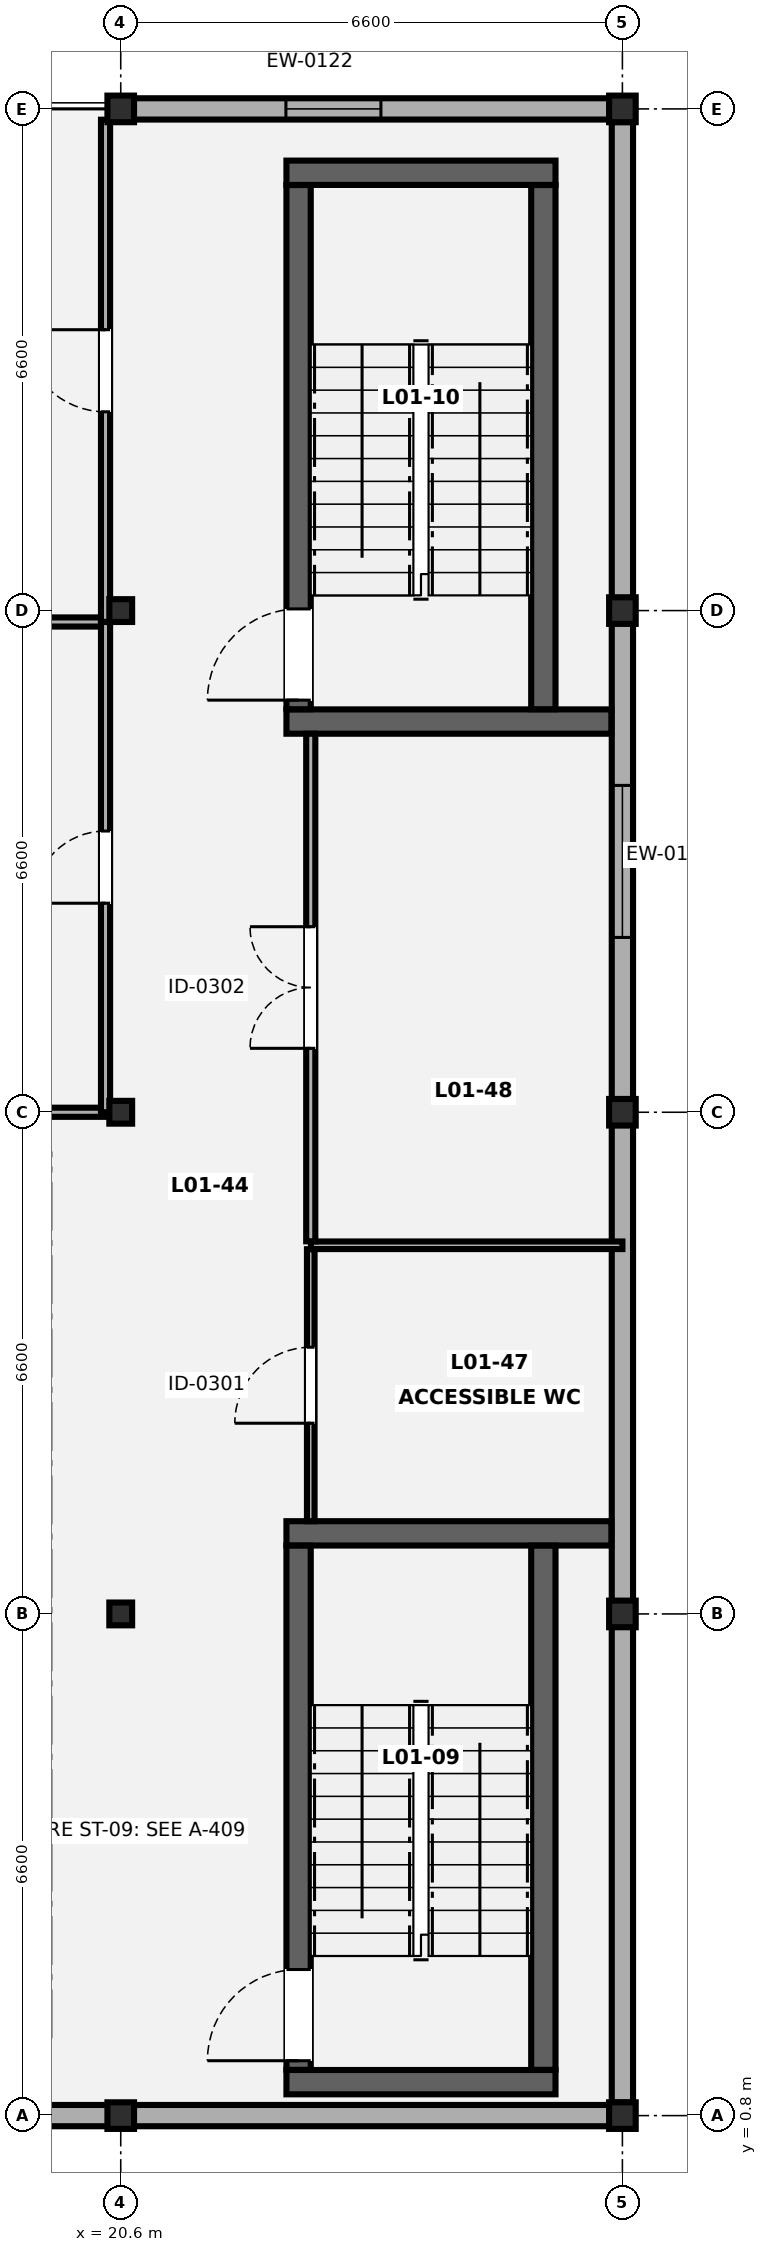
"""IFC4 building model, lengths in metres.
Left out: names, types, materials, properties, quantities, classifications, styles, units other than length and angle.
Written with IfcOpenShell. Run it as: python <this file> out.ifc"""

import sys

from ifc_helpers import new_model, si_unit, direction, frame, frame_2d, origin, origin_2d, place, context, subcontext, project, spatial, rectangle, hollow_rectangle, i_section, extrude, element, fill, save


model = new_model("IFC4")
c1 = context("Model", 3, precision=1e-05, world=origin(), true_north=direction((0.0, 1.0)))
c2 = subcontext(c1, "Body", "Model", "MODEL_VIEW")
j1 = project(units=[si_unit("LENGTHUNIT", "METRE"), si_unit("PLANEANGLEUNIT", "RADIAN")], contexts=[c1])
p1 = place(None, origin())
s1 = spatial("IfcSite", under=j1, at=p1, CompositionType="ELEMENT")
p2 = place(p1, origin())
s2 = spatial("IfcBuilding", under=s1, at=p2, CompositionType="ELEMENT")
p3 = place(p2, frame((0.0, 0.0, 4.9)))
s3 = spatial("IfcBuildingStorey", under=s2, at=p3, CompositionType="ELEMENT", Elevation=4.9)
p4 = place(p3, frame((20.6, 0.8, 0.0), z_axis=(0.0, 0.0, 1.0), x_axis=(1.0, 0.0, 0.0)))
e1 = element("IfcColumn", 1, at=p4, inside=s3, PredefinedType="COLUMN", context=c2, shape_type="SweptSolid", body=[
    extrude(i_section(OverallWidth=0.35, OverallDepth=0.35, WebThickness=0.02, FlangeThickness=0.032, FilletRadius=0.016, at=origin_2d()), origin(), (0.0, 0.0, 1.0), 4.2),
])
for number, where, z_axis, x_axis in (
    (2, (20.6, 7.4, 0.0), (0.0, 0.0, 1.0), (1.0, 0.0, 0.0)),
    (3, (20.6, 14.0, 0.0), (0.0, 0.0, 1.0), (1.0, 0.0, 0.0)),
    (4, (20.6, 20.6, 0.0), (0.0, 0.0, 1.0), (1.0, 0.0, 0.0)),
):
    element("IfcColumn", number, at=place(p3, frame(where, z_axis=z_axis, x_axis=x_axis)), inside=s3, PredefinedType="COLUMN", context=c2, shape_type="SweptSolid", body=[
        extrude(hollow_rectangle(XDim=0.3, YDim=0.3, WallThickness=0.012, at=origin_2d()), origin(), (0.0, 0.0, 1.0), 4.2),
    ])
for number, where, z_axis, x_axis in (
    (5, (20.6, 27.2, 0.0), (0.0, 0.0, 1.0), (1.0, 0.0, 0.0)),
    (6, (27.2, 0.8, 0.0), (0.0, 0.0, 1.0), (1.0, 0.0, 0.0)),
    (7, (27.2, 7.4, 0.0), (0.0, 0.0, 1.0), (1.0, 0.0, 0.0)),
    (8, (27.2, 14.0, 0.0), (0.0, 0.0, 1.0), (1.0, 0.0, 0.0)),
    (9, (27.2, 20.6, 0.0), (0.0, 0.0, 1.0), (1.0, 0.0, 0.0)),
    (10, (27.2, 27.2, 0.0), (0.0, 0.0, 1.0), (1.0, 0.0, 0.0)),
):
    element("IfcColumn", number, at=place(p3, frame(where, z_axis=z_axis, x_axis=x_axis)), inside=s3, PredefinedType="COLUMN", context=c2, shape_type="SweptSolid", body=[
        extrude(i_section(OverallWidth=0.35, OverallDepth=0.35, WebThickness=0.02, FlangeThickness=0.032, FilletRadius=0.016, at=origin_2d()), origin(), (0.0, 0.0, 1.0), 4.2),
    ])
p5 = place(p3, frame((20.773, 27.2, 0.0), z_axis=(0.0, 0.0, 1.0), x_axis=(1.0, 0.0, 0.0)))
e11 = element("IfcWall", 11, at=p5, inside=s3, PredefinedType="SOLIDWALL", context=c2, shape_type="SweptSolid", body=[
    extrude(rectangle(XDim=6.254, YDim=0.28, at=frame_2d((3.127, 0.0))), origin(), (0.0, 0.0, 1.0), 3.505),
])
p6 = place(p5, frame((2.0, 0.0, 0.85)))
e12 = element("IfcOpeningElement", 12, at=p6, cuts=e11, PredefinedType="OPENING", context=c2, shape_type="SweptSolid", body=[
    extrude(rectangle(XDim=1.25, YDim=1.4, at=frame_2d((0.625, 0.7))), frame((0.0, 0.15, 0.0), z_axis=(0.0, -1.0, 0.0), x_axis=(1.0, 0.0, 0.0)), (0.0, 0.0, 1.0), 0.3),
])
p7 = place(p3, frame((27.2, 27.027, 0.0), z_axis=(0.0, 0.0, 1.0), x_axis=(0.0, -1.0, 0.0)))
e13 = element("IfcWall", 13, at=p7, inside=s3, PredefinedType="SOLIDWALL", context=c2, shape_type="SweptSolid", body=[
    extrude(rectangle(XDim=26.054, YDim=0.28, at=frame_2d((13.027, 0.0))), origin(), (0.0, 0.0, 1.0), 3.445),
])
p8 = place(p7, frame((8.727, 0.0, 0.85)))
e14 = element("IfcOpeningElement", 14, at=p8, cuts=e13, PredefinedType="OPENING", context=c2, shape_type="SweptSolid", body=[
    extrude(rectangle(XDim=2.0, YDim=1.4, at=frame_2d((1.0, 0.7))), frame((0.0, 0.15, 0.0), z_axis=(0.0, -1.0, 0.0), x_axis=(1.0, 0.0, 0.0)), (0.0, 0.0, 1.0), 0.3),
])
p9 = place(p3, frame((27.027, 0.8, 0.0), z_axis=(0.0, 0.0, 1.0), x_axis=(-1.0, 0.0, 0.0)))
e15 = element("IfcWall", 15, at=p9, inside=s3, PredefinedType="SOLIDWALL", context=c2, shape_type="SweptSolid", body=[
    extrude(rectangle(XDim=26.054, YDim=0.28, at=frame_2d((13.027, 0.0))), origin(), (0.0, 0.0, 1.0), 3.505),
])
p10 = place(p9, frame((8.0, 0.0, 0.85)))
e16 = element("IfcOpeningElement", 16, at=p10, cuts=e15, PredefinedType="OPENING", context=c2, shape_type="SweptSolid", body=[
    extrude(rectangle(XDim=2.3, YDim=1.4, at=frame_2d((1.15, 0.7))), frame((0.0, 0.15, 0.0), z_axis=(0.0, -1.0, 0.0), x_axis=(1.0, 0.0, 0.0)), (0.0, 0.0, 1.0), 0.3),
])
p11 = place(p9, frame((16.0, 0.0, 0.85)))
e17 = element("IfcOpeningElement", 17, at=p11, cuts=e15, PredefinedType="OPENING", context=c2, shape_type="SweptSolid", body=[
    extrude(rectangle(XDim=2.45, YDim=1.4, at=frame_2d((1.225, 0.7))), frame((0.0, 0.15, 0.0), z_axis=(0.0, -1.0, 0.0), x_axis=(1.0, 0.0, 0.0)), (0.0, 0.0, 1.0), 0.3),
])
p12 = place(p3, frame((22.78, 1.24, 0.0), z_axis=(0.0, 0.0, 1.0), x_axis=(1.0, 0.0, 0.0)))
e18 = element("IfcWall", 18, at=p12, inside=s3, PredefinedType="SHEAR", context=c2, shape_type="SweptSolid", body=[
    extrude(rectangle(XDim=3.54, YDim=0.32, at=frame_2d((1.77, 0.0))), origin(), (0.0, 0.0, 1.0), 3.96),
])
p13 = place(p3, frame((22.78, 8.46, 0.0), z_axis=(0.0, 0.0, 1.0), x_axis=(1.0, 0.0, 0.0)))
e19 = element("IfcWall", 19, at=p13, inside=s3, PredefinedType="SHEAR", context=c2, shape_type="SweptSolid", body=[
    extrude(rectangle(XDim=4.275, YDim=0.32, at=frame_2d((2.137, 0.0))), origin(), (0.0, 0.0, 1.0), 3.96),
])
p14 = place(p3, frame((22.94, 1.402, 0.0), z_axis=(0.0, 0.0, 1.0), x_axis=(0.0, 1.0, 0.0)))
e20 = element("IfcWall", 20, at=p14, inside=s3, PredefinedType="SHEAR", context=c2, shape_type="SweptSolid", body=[
    extrude(rectangle(XDim=6.896, YDim=0.32, at=frame_2d((3.448, 0.0))), origin(), (0.0, 0.0, 1.0), 3.96),
])
p15 = place(p14, frame((0.12, 0.0, 0.0)))
e21 = element("IfcOpeningElement", 21, at=p15, cuts=e20, PredefinedType="OPENING", context=c2, shape_type="SweptSolid", body=[
    extrude(rectangle(XDim=1.2, YDim=2.15, at=frame_2d((0.6, 1.075))), frame((0.0, 0.17, 0.0), z_axis=(0.0, -1.0, 0.0), x_axis=(1.0, 0.0, 0.0)), (0.0, 0.0, 1.0), 0.34),
])
p16 = place(p3, frame((26.16, 1.402, 0.0), z_axis=(0.0, 0.0, 1.0), x_axis=(0.0, 1.0, 0.0)))
e22 = element("IfcWall", 22, at=p16, inside=s3, PredefinedType="SHEAR", context=c2, shape_type="SweptSolid", body=[
    extrude(rectangle(XDim=6.896, YDim=0.32, at=frame_2d((3.448, 0.0))), origin(), (0.0, 0.0, 1.0), 3.96),
])
p17 = place(p3, frame((22.78, 19.14, 0.0), z_axis=(0.0, 0.0, 1.0), x_axis=(1.0, 0.0, 0.0)))
e23 = element("IfcWall", 23, at=p17, inside=s3, PredefinedType="SHEAR", context=c2, shape_type="SweptSolid", body=[
    extrude(rectangle(XDim=4.275, YDim=0.32, at=frame_2d((2.137, 0.0))), origin(), (0.0, 0.0, 1.0), 3.96),
])
p18 = place(p3, frame((22.78, 26.36, 0.0), z_axis=(0.0, 0.0, 1.0), x_axis=(1.0, 0.0, 0.0)))
e24 = element("IfcWall", 24, at=p18, inside=s3, PredefinedType="SHEAR", context=c2, shape_type="SweptSolid", body=[
    extrude(rectangle(XDim=3.54, YDim=0.32, at=frame_2d((1.77, 0.0))), origin(), (0.0, 0.0, 1.0), 3.96),
])
p19 = place(p3, frame((22.94, 19.302, 0.0), z_axis=(0.0, 0.0, 1.0), x_axis=(0.0, 1.0, 0.0)))
e25 = element("IfcWall", 25, at=p19, inside=s3, PredefinedType="SHEAR", context=c2, shape_type="SweptSolid", body=[
    extrude(rectangle(XDim=6.896, YDim=0.32, at=frame_2d((3.448, 0.0))), origin(), (0.0, 0.0, 1.0), 3.96),
])
p20 = place(p19, frame((0.12, 0.0, 0.0)))
e26 = element("IfcOpeningElement", 26, at=p20, cuts=e25, PredefinedType="OPENING", context=c2, shape_type="SweptSolid", body=[
    extrude(rectangle(XDim=1.2, YDim=2.15, at=frame_2d((0.6, 1.075))), frame((0.0, 0.17, 0.0), z_axis=(0.0, -1.0, 0.0), x_axis=(1.0, 0.0, 0.0)), (0.0, 0.0, 1.0), 0.34),
])
p21 = place(p3, frame((26.16, 19.302, 0.0), z_axis=(0.0, 0.0, 1.0), x_axis=(0.0, 1.0, 0.0)))
e27 = element("IfcWall", 27, at=p21, inside=s3, PredefinedType="SHEAR", context=c2, shape_type="SweptSolid", body=[
    extrude(rectangle(XDim=6.896, YDim=0.32, at=frame_2d((3.448, 0.0))), origin(), (0.0, 0.0, 1.0), 3.96),
])
for number, where, z_axis, x_axis in (
    (28, (0.8, 14.0, 0.0), (0.0, 0.0, 1.0), (1.0, 0.0, 0.0)),
    (29, (0.8, 20.45, 0.0), (0.0, 0.0, 1.0), (1.0, 0.0, 0.0)),
):
    element("IfcWall", number, at=place(p3, frame(where, z_axis=z_axis, x_axis=x_axis)), inside=s3, PredefinedType="PARTITIONING", context=c2, shape_type="SweptSolid", body=[
        extrude(rectangle(XDim=19.6, YDim=0.12, at=frame_2d((9.8, 0.0))), origin(), (0.0, 0.0, 1.0), 2.997),
    ])
p22 = place(p3, frame((20.4, 14.0, 0.0), z_axis=(0.0, 0.0, 1.0), x_axis=(0.0, 1.0, 0.0)))
e30 = element("IfcWall", 30, at=p22, inside=s3, PredefinedType="PARTITIONING", context=c2, shape_type="SweptSolid", body=[
    extrude(rectangle(XDim=6.45, YDim=0.12, at=frame_2d((3.225, 0.0))), origin(), (0.0, 0.0, 1.0), 3.445),
])
p23 = place(p22, frame((2.75, 0.0, 0.0)))
e31 = element("IfcOpeningElement", 31, at=p23, cuts=e30, PredefinedType="OPENING", context=c2, shape_type="SweptSolid", body=[
    extrude(rectangle(XDim=0.95, YDim=2.1, at=frame_2d((0.475, 1.05))), frame((0.0, 0.07, 0.0), z_axis=(0.0, -1.0, 0.0), x_axis=(1.0, 0.0, 0.0)), (0.0, 0.0, 1.0), 0.14),
])
p24 = place(p3, frame((20.4, 20.452, 0.0), z_axis=(0.0, 0.0, 1.0), x_axis=(0.0, 1.0, 0.0)))
e32 = element("IfcWall", 32, at=p24, inside=s3, PredefinedType="PARTITIONING", context=c2, shape_type="SweptSolid", body=[
    extrude(rectangle(XDim=6.606, YDim=0.12, at=frame_2d((3.303, 0.0))), origin(), (0.0, 0.0, 1.0), 3.445),
])
p25 = place(p24, frame((2.763, 0.0, 0.0)))
e33 = element("IfcOpeningElement", 33, at=p25, cuts=e32, PredefinedType="OPENING", context=c2, shape_type="SweptSolid", body=[
    extrude(rectangle(XDim=1.08, YDim=2.12, at=frame_2d((0.54, 1.06))), frame((0.0, 0.07, 0.0), z_axis=(0.0, -1.0, 0.0), x_axis=(1.0, 0.0, 0.0)), (0.0, 0.0, 1.0), 0.14),
])
p26 = place(p3, frame((23.102, 12.25, 0.0), z_axis=(0.0, 0.0, 1.0), x_axis=(1.0, 0.0, 0.0)))
e34 = element("IfcWall", 34, at=p26, inside=s3, PredefinedType="PARTITIONING", context=c2, shape_type="SweptSolid", body=[
    extrude(rectangle(XDim=4.098, YDim=0.1, at=frame_2d((2.049, 0.0))), origin(), (0.0, 0.0, 1.0), 3.96),
])
p27 = place(p3, frame((23.1, 8.62, 0.0), z_axis=(0.0, 0.0, 1.0), x_axis=(0.0, 1.0, 0.0)))
e35 = element("IfcWall", 35, at=p27, inside=s3, PredefinedType="PARTITIONING", context=c2, shape_type="SweptSolid", body=[
    extrude(rectangle(XDim=3.578, YDim=0.1, at=frame_2d((1.789, 0.0))), origin(), (0.0, 0.0, 1.0), 3.96),
])
p28 = place(p27, frame((1.289, 0.0, 0.0)))
e36 = element("IfcOpeningElement", 36, at=p28, cuts=e35, PredefinedType="OPENING", context=c2, shape_type="SweptSolid", body=[
    extrude(rectangle(XDim=1.0, YDim=2.1, at=frame_2d((0.5, 1.05))), frame((0.0, 0.06, 0.0), z_axis=(0.0, -1.0, 0.0), x_axis=(1.0, 0.0, 0.0)), (0.0, 0.0, 1.0), 0.12),
])
p29 = place(p3, frame((23.1, 12.302, 0.0), z_axis=(0.0, 0.0, 1.0), x_axis=(0.0, 1.0, 0.0)))
e37 = element("IfcWall", 37, at=p29, inside=s3, PredefinedType="PARTITIONING", context=c2, shape_type="SweptSolid", body=[
    extrude(rectangle(XDim=6.678, YDim=0.12, at=frame_2d((3.339, 0.0))), origin(), (0.0, 0.0, 1.0), 3.96),
])
p30 = place(p29, frame((2.539, 0.0, 0.0)))
e38 = element("IfcOpeningElement", 38, at=p30, cuts=e37, PredefinedType="OPENING", context=c2, shape_type="SweptSolid", body=[
    extrude(rectangle(XDim=1.6, YDim=2.18, at=frame_2d((0.8, 1.09))), frame((0.0, 0.07, 0.0), z_axis=(0.0, -1.0, 0.0), x_axis=(1.0, 0.0, 0.0)), (0.0, 0.0, 1.0), 0.14),
])
p31 = place(p6, origin())
e39 = element("IfcWindow", 39, at=p31, inside=s3, PartitioningType="SINGLE_PANEL", PredefinedType="WINDOW", context=c2, shape_type="SweptSolid", body=[
    extrude(rectangle(XDim=1.25, YDim=1.4, at=frame_2d((0.625, 0.7))), frame((0.0, 0.03, 0.0), z_axis=(0.0, -1.0, 0.0), x_axis=(1.0, 0.0, 0.0)), (0.0, 0.0, 1.0), 0.06),
])
fill(e12, e39)
p32 = place(p8, origin())
e40 = element("IfcWindow", 40, at=p32, inside=s3, PartitioningType="SINGLE_PANEL", PredefinedType="WINDOW", context=c2, shape_type="SweptSolid", body=[
    extrude(rectangle(XDim=2.0, YDim=1.4, at=frame_2d((1.0, 0.7))), frame((0.0, 0.03, 0.0), z_axis=(0.0, -1.0, 0.0), x_axis=(1.0, 0.0, 0.0)), (0.0, 0.0, 1.0), 0.06),
])
fill(e14, e40)
p33 = place(p15, origin())
e41 = element("IfcDoor", 41, at=p33, inside=s3, OperationType="SINGLE_SWING_LEFT", PredefinedType="DOOR", context=c2, shape_type="SweptSolid", body=[
    extrude(rectangle(XDim=1.2, YDim=2.15, at=frame_2d((0.6, 1.075))), frame((0.0, 0.025, 0.0), z_axis=(0.0, -1.0, 0.0), x_axis=(1.0, 0.0, 0.0)), (0.0, 0.0, 1.0), 0.05),
])
fill(e21, e41)
p34 = place(p20, origin())
e42 = element("IfcDoor", 42, at=p34, inside=s3, OperationType="SINGLE_SWING_LEFT", PredefinedType="DOOR", context=c2, shape_type="SweptSolid", body=[
    extrude(rectangle(XDim=1.2, YDim=2.15, at=frame_2d((0.6, 1.075))), frame((0.0, 0.025, 0.0), z_axis=(0.0, -1.0, 0.0), x_axis=(1.0, 0.0, 0.0)), (0.0, 0.0, 1.0), 0.05),
])
fill(e26, e42)
p35 = place(p23, origin())
e43 = element("IfcDoor", 43, at=p35, inside=s3, OperationType="SINGLE_SWING_LEFT", PredefinedType="DOOR", context=c2, shape_type="SweptSolid", body=[
    extrude(rectangle(XDim=0.95, YDim=2.1, at=frame_2d((0.475, 1.05))), frame((0.0, 0.025, 0.0), z_axis=(0.0, -1.0, 0.0), x_axis=(1.0, 0.0, 0.0)), (0.0, 0.0, 1.0), 0.05),
])
fill(e31, e43)
p36 = place(p25, origin())
e44 = element("IfcDoor", 44, at=p36, inside=s3, OperationType="SINGLE_SWING_RIGHT", PredefinedType="DOOR", context=c2, shape_type="SweptSolid", body=[
    extrude(rectangle(XDim=1.08, YDim=2.12, at=frame_2d((0.54, 1.06))), frame((0.0, 0.025, 0.0), z_axis=(0.0, -1.0, 0.0), x_axis=(1.0, 0.0, 0.0)), (0.0, 0.0, 1.0), 0.05),
])
fill(e33, e44)
p37 = place(p28, origin())
e45 = element("IfcDoor", 45, at=p37, inside=s3, OperationType="SINGLE_SWING_LEFT", PredefinedType="DOOR", context=c2, shape_type="SweptSolid", body=[
    extrude(rectangle(XDim=1.0, YDim=2.1, at=frame_2d((0.5, 1.05))), frame((0.0, 0.025, 0.0), z_axis=(0.0, -1.0, 0.0), x_axis=(1.0, 0.0, 0.0)), (0.0, 0.0, 1.0), 0.05),
])
fill(e36, e45)
p38 = place(p30, origin())
e46 = element("IfcDoor", 46, at=p38, inside=s3, OperationType="DOUBLE_DOOR_SINGLE_SWING", PredefinedType="DOOR", context=c2, shape_type="SweptSolid", body=[
    extrude(rectangle(XDim=1.6, YDim=2.18, at=frame_2d((0.8, 1.09))), frame((0.0, 0.025, 0.0), z_axis=(0.0, -1.0, 0.0), x_axis=(1.0, 0.0, 0.0)), (0.0, 0.0, 1.0), 0.05),
])
fill(e38, e46)
save(model, sys.argv[1])
